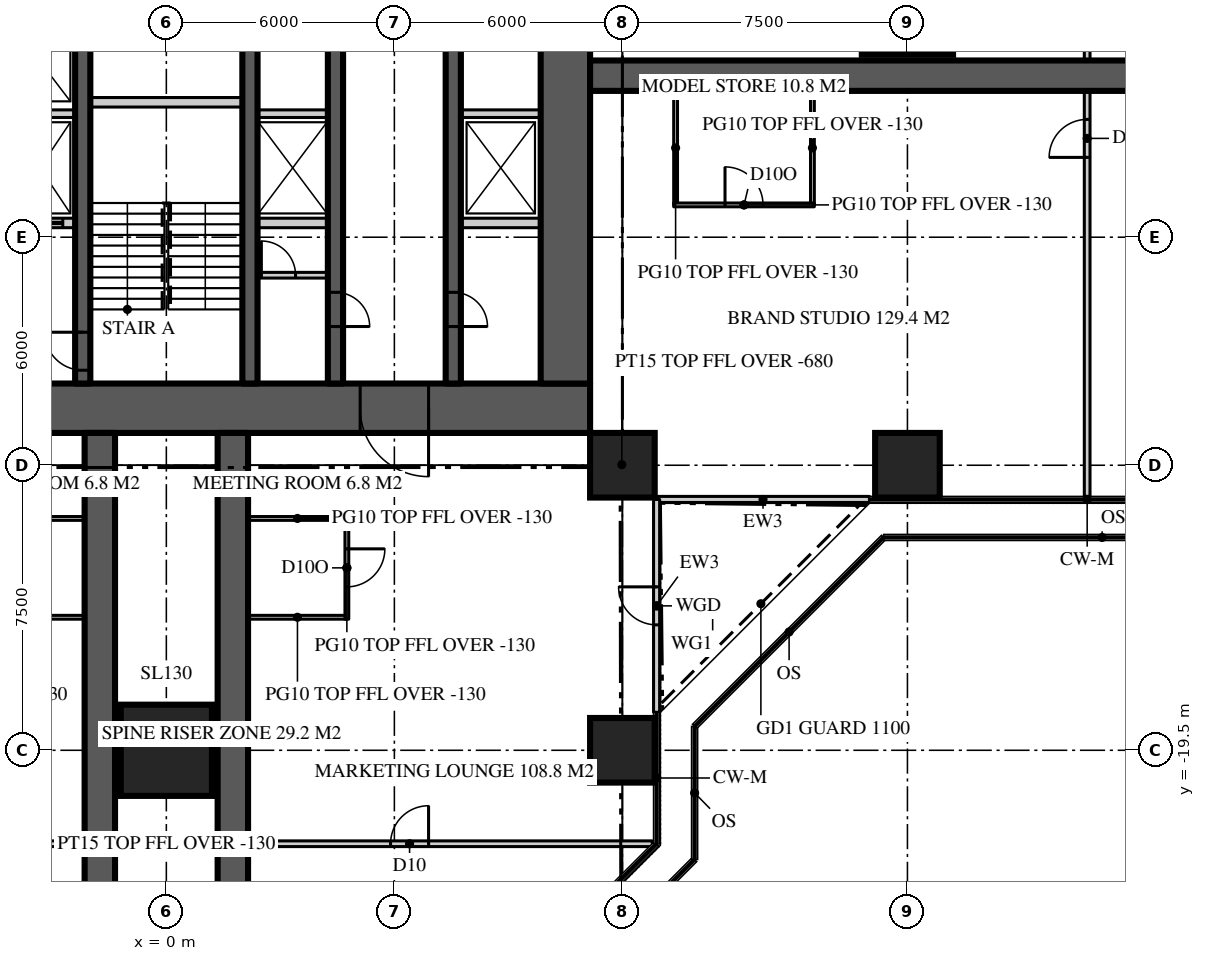
"""IFC4 building model, lengths in metres.
Left out: names, types, materials, properties, quantities, classifications, styles, units other than length and angle.
Written with IfcOpenShell. Run it as: python <this file> out.ifc"""

import sys

from ifc_helpers import new_model, si_unit, direction, frame, frame_2d, origin, origin_2d, place, context, subcontext, project, spatial, rectangle, extrude, element, fill, save


model = new_model("IFC4")
c1 = context("Model", 3, precision=1e-05, world=origin(), true_north=direction((0.0, 1.0)))
c2 = subcontext(c1, "Body", "Model", "MODEL_VIEW")
j1 = project(units=[si_unit("LENGTHUNIT", "METRE"), si_unit("PLANEANGLEUNIT", "RADIAN")], contexts=[c1])
p1 = place(None, origin())
s1 = spatial("IfcSite", under=j1, at=p1, CompositionType="ELEMENT")
p2 = place(p1, origin())
s2 = spatial("IfcBuilding", under=s1, at=p2, CompositionType="ELEMENT")
p3 = place(p2, frame((0.0, 0.0, 182.7)))
s3 = spatial("IfcBuildingStorey", under=s2, at=p3, CompositionType="ELEMENT", Elevation=182.7)
p4 = place(p3, frame((11.15, -10.5, 0.0), z_axis=(0.0, 0.0, 1.0), x_axis=(-1.0, 0.0, 0.0)))
e1 = element("IfcWall", 1, at=p4, inside=s3, PredefinedType="SHEAR", context=c2, shape_type="SweptSolid", body=[
    extrude(rectangle(XDim=22.3, YDim=1.3, at=frame_2d((11.15, 0.0))), origin(), (0.0, 0.0, 1.0), 3.9),
])
p5 = place(p4, frame((16.25, 0.0, 0.0)))
e2 = element("IfcOpeningElement", 2, at=p5, cuts=e1, PredefinedType="OPENING", context=c2, shape_type="SweptSolid", body=[
    extrude(rectangle(XDim=1.8, YDim=2.2, at=frame_2d((0.9, 1.1))), frame((0.0, 0.66, 0.0), z_axis=(0.0, -1.0, 0.0), x_axis=(1.0, 0.0, 0.0)), (0.0, 0.0, 1.0), 1.32),
])
p6 = place(p4, frame((4.25, 0.0, 0.0)))
e3 = element("IfcOpeningElement", 3, at=p6, cuts=e1, PredefinedType="OPENING", context=c2, shape_type="SweptSolid", body=[
    extrude(rectangle(XDim=1.8, YDim=2.2, at=frame_2d((0.9, 1.1))), frame((0.0, 0.66, 0.0), z_axis=(0.0, -1.0, 0.0), x_axis=(1.0, 0.0, 0.0)), (0.0, 0.0, 1.0), 1.32),
])
p7 = place(p3, frame((10.5, -9.85, 0.0), z_axis=(0.0, 0.0, 1.0), x_axis=(0.0, 1.0, 0.0)))
e4 = element("IfcWall", 4, at=p7, inside=s3, PredefinedType="SHEAR", context=c2, shape_type="SweptSolid", body=[
    extrude(rectangle(XDim=19.7, YDim=1.3, at=frame_2d((9.85, 0.0))), origin(), (0.0, 0.0, 1.0), 3.9),
])
p8 = place(p7, frame((17.25, 0.0, 0.0)))
e5 = element("IfcOpeningElement", 5, at=p8, cuts=e4, PredefinedType="OPENING", context=c2, shape_type="SweptSolid", body=[
    extrude(rectangle(XDim=1.0, YDim=2.2, at=frame_2d((0.5, 1.1))), frame((0.0, 0.66, 0.0), z_axis=(0.0, -1.0, 0.0), x_axis=(1.0, 0.0, 0.0)), (0.0, 0.0, 1.0), 1.32),
])
for number, where, z_axis, x_axis in (
    (6, (11.15, -1.75, 0.0), (0.0, 0.0, 1.0), (1.0, 0.0, 0.0)),
    (7, (-1.75, -11.15, 0.0), (0.0, 0.0, 1.0), (0.0, -1.0, 0.0)),
    (8, (1.75, -11.15, 0.0), (0.0, 0.0, 1.0), (0.0, -1.0, 0.0)),
):
    element("IfcWall", number, at=place(p3, frame(where, z_axis=z_axis, x_axis=x_axis)), inside=s3, PredefinedType="SHEAR", context=c2, shape_type="SweptSolid", body=[
        extrude(rectangle(XDim=15.25, YDim=0.8, at=frame_2d((7.625, 0.0))), origin(), (0.0, 0.0, 1.0), 3.9),
    ])
p9 = place(p3, frame((0.0, -19.5, 0.0), z_axis=(0.0, 0.0, 1.0), x_axis=(1.0, 0.0, 0.0)))
e9 = element("IfcColumn", 9, at=p9, inside=s3, PredefinedType="COLUMN", context=c2, shape_type="SweptSolid", body=[
    extrude(rectangle(XDim=2.4, YDim=2.4, at=origin_2d()), origin(), (0.0, 0.0, 1.0), 3.9),
])
for number, where, z_axis, x_axis in (
    (10, (12.0, -19.5, 0.0), (0.0, 0.0, 1.0), (1.0, 0.0, 0.0)),
    (11, (12.0, -12.0, 0.0), (0.0, 0.0, 1.0), (1.0, 0.0, 0.0)),
    (12, (19.5, -12.0, 0.0), (0.0, 0.0, 1.0), (1.0, 0.0, 0.0)),
):
    element("IfcColumn", number, at=place(p3, frame(where, z_axis=z_axis, x_axis=x_axis)), inside=s3, PredefinedType="COLUMN", context=c2, shape_type="SweptSolid", body=[
        extrude(rectangle(XDim=1.7, YDim=1.7, at=origin_2d()), origin(), (0.0, 0.0, 1.0), 3.9),
    ])
p10 = place(p3, frame((19.5, 0.0, 0.0), z_axis=(0.0, 0.0, 1.0), x_axis=(1.0, 0.0, 0.0)))
e13 = element("IfcColumn", 13, at=p10, inside=s3, PredefinedType="COLUMN", context=c2, shape_type="SweptSolid", body=[
    extrude(rectangle(XDim=2.4, YDim=2.4, at=origin_2d()), origin(), (0.0, 0.0, 1.0), 3.9),
])
p11 = place(p3, frame((12.9, -12.9, 0.0), z_axis=(0.0, 0.0, 1.0), x_axis=(1.0, 0.0, 0.0)))
e14 = element("IfcWall", 14, at=p11, inside=s3, PredefinedType="SOLIDWALL", context=c2, shape_type="SweptSolid", body=[
    extrude(rectangle(XDim=5.6, YDim=0.16, at=frame_2d((2.8, 0.0))), origin(), (0.0, 0.0, 1.0), 3.77),
])
p12 = place(p3, frame((12.9, -18.5, 0.0), z_axis=(0.0, 0.0, 1.0), x_axis=(0.0, 1.0, 0.0)))
e15 = element("IfcWall", 15, at=p12, inside=s3, PredefinedType="SOLIDWALL", context=c2, shape_type="SweptSolid", body=[
    extrude(rectangle(XDim=5.6, YDim=0.16, at=frame_2d((2.8, 0.0))), origin(), (0.0, 0.0, 1.0), 3.77),
])
p13 = place(p12, frame((2.3, 0.0, 0.0)))
e16 = element("IfcOpeningElement", 16, at=p13, cuts=e15, PredefinedType="OPENING", context=c2, shape_type="SweptSolid", body=[
    extrude(rectangle(XDim=1.0, YDim=2.2, at=frame_2d((0.5, 1.1))), frame((0.0, 0.09, 0.0), z_axis=(0.0, -1.0, 0.0), x_axis=(1.0, 0.0, 0.0)), (0.0, 0.0, 1.0), 0.18),
])
p14 = place(p3, frame((7.55, 9.85, 0.0), z_axis=(0.0, 0.0, 1.0), x_axis=(0.0, -1.0, 0.0)))
e17 = element("IfcWall", 17, at=p14, inside=s3, PredefinedType="SHEAR", context=c2, shape_type="SweptSolid", body=[
    extrude(rectangle(XDim=19.7, YDim=0.4, at=frame_2d((9.85, 0.0))), origin(), (0.0, 0.0, 1.0), 3.9),
])
p15 = place(p14, frame((1.45, 0.0, 0.0)))
e18 = element("IfcOpeningElement", 18, at=p15, cuts=e17, PredefinedType="OPENING", context=c2, shape_type="SweptSolid", body=[
    extrude(rectangle(XDim=1.0, YDim=2.2, at=frame_2d((0.5, 1.1))), frame((0.0, 0.21, 0.0), z_axis=(0.0, -1.0, 0.0), x_axis=(1.0, 0.0, 0.0)), (0.0, 0.0, 1.0), 0.42),
])
p16 = place(p14, frame((17.3, 0.0, 0.0)))
e19 = element("IfcOpeningElement", 19, at=p16, cuts=e17, PredefinedType="OPENING", context=c2, shape_type="SweptSolid", body=[
    extrude(rectangle(XDim=0.9, YDim=2.1, at=frame_2d((0.45, 1.05))), frame((0.0, 0.21, 0.0), z_axis=(0.0, -1.0, 0.0), x_axis=(1.0, 0.0, 0.0)), (0.0, 0.0, 1.0), 0.42),
])
p17 = place(p3, frame((4.45, 9.85, 0.0), z_axis=(0.0, 0.0, 1.0), x_axis=(0.0, -1.0, 0.0)))
e20 = element("IfcWall", 20, at=p17, inside=s3, PredefinedType="SHEAR", context=c2, shape_type="SweptSolid", body=[
    extrude(rectangle(XDim=19.7, YDim=0.4, at=frame_2d((9.85, 0.0))), origin(), (0.0, 0.0, 1.0), 3.9),
])
p18 = place(p17, frame((1.95, 0.0, 0.0)))
e21 = element("IfcOpeningElement", 21, at=p18, cuts=e20, PredefinedType="OPENING", context=c2, shape_type="SweptSolid", body=[
    extrude(rectangle(XDim=1.0, YDim=2.2, at=frame_2d((0.5, 1.1))), frame((0.0, 0.21, 0.0), z_axis=(0.0, -1.0, 0.0), x_axis=(1.0, 0.0, 0.0)), (0.0, 0.0, 1.0), 0.42),
])
p19 = place(p17, frame((17.3, 0.0, 0.0)))
e22 = element("IfcOpeningElement", 22, at=p19, cuts=e20, PredefinedType="OPENING", context=c2, shape_type="SweptSolid", body=[
    extrude(rectangle(XDim=0.9, YDim=2.1, at=frame_2d((0.45, 1.05))), frame((0.0, 0.21, 0.0), z_axis=(0.0, -1.0, 0.0), x_axis=(1.0, 0.0, 0.0)), (0.0, 0.0, 1.0), 0.42),
])
p20 = place(p3, frame((-2.2, -9.85, 0.0), z_axis=(0.0, 0.0, 1.0), x_axis=(0.0, 1.0, 0.0)))
e23 = element("IfcWall", 23, at=p20, inside=s3, PredefinedType="SHEAR", context=c2, shape_type="SweptSolid", body=[
    extrude(rectangle(XDim=19.7, YDim=0.4, at=frame_2d((9.85, 0.0))), origin(), (0.0, 0.0, 1.0), 3.9),
])
p21 = place(p20, frame((0.35, 0.0, 0.0)))
e24 = element("IfcOpeningElement", 24, at=p21, cuts=e23, PredefinedType="OPENING", context=c2, shape_type="SweptSolid", body=[
    extrude(rectangle(XDim=1.0, YDim=2.2, at=frame_2d((0.5, 1.1))), frame((0.0, 0.21, 0.0), z_axis=(0.0, -1.0, 0.0), x_axis=(1.0, 0.0, 0.0)), (0.0, 0.0, 1.0), 0.42),
])
p22 = place(p3, frame((2.2, 9.85, 0.0), z_axis=(0.0, 0.0, 1.0), x_axis=(0.0, -1.0, 0.0)))
e25 = element("IfcWall", 25, at=p22, inside=s3, PredefinedType="SHEAR", context=c2, shape_type="SweptSolid", body=[
    extrude(rectangle(XDim=19.7, YDim=0.4, at=frame_2d((9.85, 0.0))), origin(), (0.0, 0.0, 1.0), 3.9),
])
p23 = place(p22, frame((0.35, 0.0, 0.0)))
e26 = element("IfcOpeningElement", 26, at=p23, cuts=e25, PredefinedType="OPENING", context=c2, shape_type="SweptSolid", body=[
    extrude(rectangle(XDim=1.0, YDim=2.2, at=frame_2d((0.5, 1.1))), frame((0.0, 0.21, 0.0), z_axis=(0.0, -1.0, 0.0), x_axis=(1.0, 0.0, 0.0)), (0.0, 0.0, 1.0), 0.42),
])
p24 = place(p3, frame((-4.25, -5.625, 0.0), z_axis=(0.0, 0.0, 1.0), x_axis=(1.0, 0.0, 0.0)))
e27 = element("IfcWall", 27, at=p24, inside=s3, PredefinedType="SOLIDWALL", context=c2, shape_type="SweptSolid", body=[
    extrude(rectangle(XDim=1.85, YDim=0.25, at=frame_2d((0.925, 0.0))), origin(), (0.0, 0.0, 1.0), 3.7),
])
p25 = place(p24, frame((0.325, 0.0, 0.0)))
e28 = element("IfcOpeningElement", 28, at=p25, cuts=e27, PredefinedType="OPENING", context=c2, shape_type="SweptSolid", body=[
    extrude(rectangle(XDim=1.2, YDim=2.2, at=frame_2d((0.6, 1.1))), frame((0.0, 0.135, 0.0), z_axis=(0.0, -1.0, 0.0), x_axis=(1.0, 0.0, 0.0)), (0.0, 0.0, 1.0), 0.27),
])
p26 = place(p3, frame((2.4, -5.625, 0.0), z_axis=(0.0, 0.0, 1.0), x_axis=(1.0, 0.0, 0.0)))
e29 = element("IfcWall", 29, at=p26, inside=s3, PredefinedType="SOLIDWALL", context=c2, shape_type="SweptSolid", body=[
    extrude(rectangle(XDim=1.85, YDim=0.25, at=frame_2d((0.925, 0.0))), origin(), (0.0, 0.0, 1.0), 3.7),
])
p27 = place(p3, frame((7.75, -5.625, 0.0), z_axis=(0.0, 0.0, 1.0), x_axis=(1.0, 0.0, 0.0)))
e30 = element("IfcWall", 30, at=p27, inside=s3, PredefinedType="SOLIDWALL", context=c2, shape_type="SweptSolid", body=[
    extrude(rectangle(XDim=2.1, YDim=0.25, at=frame_2d((1.05, 0.0))), origin(), (0.0, 0.0, 1.0), 3.7),
])
p28 = place(p3, frame((-2.0, -2.45, 0.0), z_axis=(0.0, 0.0, 1.0), x_axis=(1.0, 0.0, 0.0)))
e31 = element("IfcWall", 31, at=p28, inside=s3, PredefinedType="SOLIDWALL", context=c2, shape_type="SweptSolid", body=[
    extrude(rectangle(XDim=4.0, YDim=0.25, at=frame_2d((2.0, 0.0))), origin(), (0.0, 0.0, 1.0), 3.7),
])
for number, where, z_axis, x_axis in (
    (32, (-4.25, -2.75, 0.0), (0.0, 0.0, 1.0), (1.0, 0.0, 0.0)),
    (33, (2.4, -2.75, 0.0), (0.0, 0.0, 1.0), (1.0, 0.0, 0.0)),
):
    element("IfcWall", number, at=place(p3, frame(where, z_axis=z_axis, x_axis=x_axis)), inside=s3, PredefinedType="SOLIDWALL", context=c2, shape_type="SweptSolid", body=[
        extrude(rectangle(XDim=1.85, YDim=0.2, at=frame_2d((0.925, 0.0))), origin(), (0.0, 0.0, 1.0), 3.7),
    ])
p29 = place(p3, frame((7.75, -2.75, 0.0), z_axis=(0.0, 0.0, 1.0), x_axis=(1.0, 0.0, 0.0)))
e34 = element("IfcWall", 34, at=p29, inside=s3, PredefinedType="SOLIDWALL", context=c2, shape_type="SweptSolid", body=[
    extrude(rectangle(XDim=2.1, YDim=0.2, at=frame_2d((1.05, 0.0))), origin(), (0.0, 0.0, 1.0), 3.7),
])
p30 = place(p3, frame((24.229, -12.82, 0.0), z_axis=(0.0, 0.0, 1.0), x_axis=(0.0, 1.0, 0.0)))
e35 = element("IfcWall", 35, at=p30, inside=s3, PredefinedType="PARTITIONING", context=c2, shape_type="SweptSolid", body=[
    extrude(rectangle(XDim=25.64, YDim=0.15, at=frame_2d((12.82, 0.0))), origin(), (0.0, 0.0, 1.0), 3.77),
])
p31 = place(p30, frame((15.72, 0.0, 0.0)))
e36 = element("IfcOpeningElement", 36, at=p31, cuts=e35, PredefinedType="OPENING", context=c2, shape_type="SweptSolid", body=[
    extrude(rectangle(XDim=1.0, YDim=2.2, at=frame_2d((0.5, 1.1))), frame((0.0, 0.085, 0.0), z_axis=(0.0, -1.0, 0.0), x_axis=(1.0, 0.0, 0.0)), (0.0, 0.0, 1.0), 0.17),
])
p32 = place(p30, frame((8.92, 0.0, 0.0)))
e37 = element("IfcOpeningElement", 37, at=p32, cuts=e35, PredefinedType="OPENING", context=c2, shape_type="SweptSolid", body=[
    extrude(rectangle(XDim=1.0, YDim=2.2, at=frame_2d((0.5, 1.1))), frame((0.0, 0.085, 0.0), z_axis=(0.0, -1.0, 0.0), x_axis=(1.0, 0.0, 0.0)), (0.0, 0.0, 1.0), 0.17),
])
for number, where, z_axis, x_axis in (
    (38, (13.4, -2.15, 0.0), (0.0, 0.0, 1.0), (0.0, -1.0, 0.0)),
    (39, (17.0, -2.15, 0.0), (0.0, 0.0, 1.0), (0.0, -1.0, 0.0)),
):
    element("IfcWall", number, at=place(p3, frame(where, z_axis=z_axis, x_axis=x_axis)), inside=s3, PredefinedType="PARTITIONING", context=c2, shape_type="SweptSolid", body=[
        extrude(rectangle(XDim=3.0, YDim=0.1, at=frame_2d((1.5, 0.0))), origin(), (0.0, 0.0, 1.0), 3.77),
    ])
p33 = place(p3, frame((13.35, -5.15, 0.0), z_axis=(0.0, 0.0, 1.0), x_axis=(1.0, 0.0, 0.0)))
e40 = element("IfcWall", 40, at=p33, inside=s3, PredefinedType="PARTITIONING", context=c2, shape_type="SweptSolid", body=[
    extrude(rectangle(XDim=3.7, YDim=0.1, at=frame_2d((1.85, 0.0))), origin(), (0.0, 0.0, 1.0), 3.77),
])
p34 = place(p33, frame((1.35, 0.0, 0.0)))
e41 = element("IfcOpeningElement", 41, at=p34, cuts=e40, PredefinedType="OPENING", context=c2, shape_type="SweptSolid", body=[
    extrude(rectangle(XDim=1.0, YDim=2.2, at=frame_2d((0.5, 1.1))), frame((0.0, 0.06, 0.0), z_axis=(0.0, -1.0, 0.0), x_axis=(1.0, 0.0, 0.0)), (0.0, 0.0, 1.0), 0.12),
])
p35 = place(p3, frame((-12.786, -21.959, 0.0), z_axis=(0.0, 0.0, 1.0), x_axis=(1.0, 0.0, 0.0)))
e42 = element("IfcWall", 42, at=p35, inside=s3, PredefinedType="PARTITIONING", context=c2, shape_type="SweptSolid", body=[
    extrude(rectangle(XDim=25.573, YDim=0.15, at=frame_2d((12.786, 0.0))), origin(), (0.0, 0.0, 1.0), 3.77),
])
p36 = place(p35, frame((18.687, 0.0, 0.0)))
e43 = element("IfcOpeningElement", 43, at=p36, cuts=e42, PredefinedType="OPENING", context=c2, shape_type="SweptSolid", body=[
    extrude(rectangle(XDim=1.0, YDim=2.2, at=frame_2d((0.5, 1.1))), frame((0.0, 0.085, 0.0), z_axis=(0.0, -1.0, 0.0), x_axis=(1.0, 0.0, 0.0)), (0.0, 0.0, 1.0), 0.17),
])
p37 = place(p35, frame((5.886, 0.0, 0.0)))
e44 = element("IfcOpeningElement", 44, at=p37, cuts=e42, PredefinedType="OPENING", context=c2, shape_type="SweptSolid", body=[
    extrude(rectangle(XDim=1.0, YDim=2.2, at=frame_2d((0.5, 1.1))), frame((0.0, 0.085, 0.0), z_axis=(0.0, -1.0, 0.0), x_axis=(1.0, 0.0, 0.0)), (0.0, 0.0, 1.0), 0.17),
])
for number, where, z_axis, x_axis in (
    (45, (2.15, -13.4, 0.0), (0.0, 0.0, 1.0), (1.0, 0.0, 0.0)),
    (46, (2.15, -16.0, 0.0), (0.0, 0.0, 1.0), (1.0, 0.0, 0.0)),
):
    element("IfcWall", number, at=place(p3, frame(where, z_axis=z_axis, x_axis=x_axis)), inside=s3, PredefinedType="PARTITIONING", context=c2, shape_type="SweptSolid", body=[
        extrude(rectangle(XDim=2.6, YDim=0.1, at=frame_2d((1.3, 0.0))), origin(), (0.0, 0.0, 1.0), 3.77),
    ])
p38 = place(p3, frame((4.75, -13.35, 0.0), z_axis=(0.0, 0.0, 1.0), x_axis=(0.0, -1.0, 0.0)))
e47 = element("IfcWall", 47, at=p38, inside=s3, PredefinedType="PARTITIONING", context=c2, shape_type="SweptSolid", body=[
    extrude(rectangle(XDim=2.7, YDim=0.1, at=frame_2d((1.35, 0.0))), origin(), (0.0, 0.0, 1.0), 3.77),
])
p39 = place(p38, frame((0.85, 0.0, 0.0)))
e48 = element("IfcOpeningElement", 48, at=p39, cuts=e47, PredefinedType="OPENING", context=c2, shape_type="SweptSolid", body=[
    extrude(rectangle(XDim=1.0, YDim=2.2, at=frame_2d((0.5, 1.1))), frame((0.0, 0.06, 0.0), z_axis=(0.0, -1.0, 0.0), x_axis=(1.0, 0.0, 0.0)), (0.0, 0.0, 1.0), 0.12),
])
for number, where, z_axis, x_axis in (
    (49, (-2.15, -13.4, 0.0), (0.0, 0.0, 1.0), (-1.0, 0.0, 0.0)),
    (50, (-2.15, -16.0, 0.0), (0.0, 0.0, 1.0), (-1.0, 0.0, 0.0)),
):
    element("IfcWall", number, at=place(p3, frame(where, z_axis=z_axis, x_axis=x_axis)), inside=s3, PredefinedType="PARTITIONING", context=c2, shape_type="SweptSolid", body=[
        extrude(rectangle(XDim=2.6, YDim=0.1, at=frame_2d((1.3, 0.0))), origin(), (0.0, 0.0, 1.0), 3.77),
    ])
p40 = place(p3, frame((11.15, -11.15, 0.0), z_axis=(0.0, 0.0, 1.0), x_axis=(0.707106781187, -0.707106781187, 0.0)))
e51 = element("IfcWall", 51, at=p40, inside=s3, PredefinedType="PARTITIONING", context=c2, shape_type="SweptSolid", body=[
    extrude(rectangle(XDim=2.362, YDim=0.15, at=frame_2d((1.181, 0.0))), origin(), (0.0, 0.0, 1.0), 3.22),
])
p41 = place(p3, frame((2.4, -7.0, 0.0), z_axis=(0.0, 0.0, 1.0), x_axis=(1.0, 0.0, 0.0)))
e52 = element("IfcWall", 52, at=p41, inside=s3, PredefinedType="SOLIDWALL", context=c2, shape_type="SweptSolid", body=[
    extrude(rectangle(XDim=1.85, YDim=0.15, at=frame_2d((0.925, 0.0))), origin(), (0.0, 0.0, 1.0), 3.77),
])
p42 = place(p41, frame((0.1, 0.0, 0.0)))
e53 = element("IfcOpeningElement", 53, at=p42, cuts=e52, PredefinedType="OPENING", context=c2, shape_type="SweptSolid", body=[
    extrude(rectangle(XDim=0.9, YDim=2.1, at=frame_2d((0.45, 1.05))), frame((0.0, 0.085, 0.0), z_axis=(0.0, -1.0, 0.0), x_axis=(1.0, 0.0, 0.0)), (0.0, 0.0, 1.0), 0.17),
])
p43 = place(p13, origin())
e54 = element("IfcDoor", 54, at=p43, inside=s3, OperationType="SINGLE_SWING_RIGHT", PredefinedType="DOOR", context=c2, shape_type="SweptSolid", body=[
    extrude(rectangle(XDim=1.0, YDim=2.2, at=frame_2d((0.5, 1.1))), frame((0.0, 0.025, 0.0), z_axis=(0.0, -1.0, 0.0), x_axis=(1.0, 0.0, 0.0)), (0.0, 0.0, 1.0), 0.05),
])
fill(e16, e54)
p44 = place(p6, origin())
e55 = element("IfcDoor", 55, at=p44, inside=s3, OperationType="DOUBLE_DOOR_DOUBLE_SWING", PredefinedType="DOOR", context=c2, shape_type="SweptSolid", body=[
    extrude(rectangle(XDim=1.8, YDim=2.2, at=frame_2d((0.9, 1.1))), frame((0.0, 0.025, 0.0), z_axis=(0.0, -1.0, 0.0), x_axis=(1.0, 0.0, 0.0)), (0.0, 0.0, 1.0), 0.05),
])
fill(e3, e55)
p45 = place(p21, origin())
e56 = element("IfcDoor", 56, at=p45, inside=s3, OperationType="SINGLE_SWING_RIGHT", PredefinedType="DOOR", context=c2, shape_type="SweptSolid", body=[
    extrude(rectangle(XDim=1.0, YDim=2.2, at=frame_2d((0.5, 1.1))), frame((0.0, 0.025, 0.0), z_axis=(0.0, -1.0, 0.0), x_axis=(1.0, 0.0, 0.0)), (0.0, 0.0, 1.0), 0.05),
])
fill(e24, e56)
p46 = place(p16, origin())
e57 = element("IfcDoor", 57, at=p46, inside=s3, OperationType="SINGLE_SWING_RIGHT", PredefinedType="DOOR", context=c2, shape_type="SweptSolid", body=[
    extrude(rectangle(XDim=0.9, YDim=2.1, at=frame_2d((0.45, 1.05))), frame((0.0, 0.025, 0.0), z_axis=(0.0, -1.0, 0.0), x_axis=(1.0, 0.0, 0.0)), (0.0, 0.0, 1.0), 0.05),
])
fill(e19, e57)
p47 = place(p19, origin())
e58 = element("IfcDoor", 58, at=p47, inside=s3, OperationType="SINGLE_SWING_RIGHT", PredefinedType="DOOR", context=c2, shape_type="SweptSolid", body=[
    extrude(rectangle(XDim=0.9, YDim=2.1, at=frame_2d((0.45, 1.05))), frame((0.0, 0.025, 0.0), z_axis=(0.0, -1.0, 0.0), x_axis=(1.0, 0.0, 0.0)), (0.0, 0.0, 1.0), 0.05),
])
fill(e22, e58)
p48 = place(p25, origin())
e59 = element("IfcDoor", 59, at=p48, inside=s3, OperationType="SLIDING_TO_LEFT", PredefinedType="DOOR", context=c2, shape_type="SweptSolid", body=[
    extrude(rectangle(XDim=1.2, YDim=2.2, at=frame_2d((0.6, 1.1))), frame((0.0, 0.025, 0.0), z_axis=(0.0, -1.0, 0.0), x_axis=(1.0, 0.0, 0.0)), (0.0, 0.0, 1.0), 0.05),
])
fill(e28, e59)
p49 = place(p32, origin())
e60 = element("IfcDoor", 60, at=p49, inside=s3, OperationType="SINGLE_SWING_LEFT", PredefinedType="DOOR", context=c2, shape_type="SweptSolid", body=[
    extrude(rectangle(XDim=1.0, YDim=2.2, at=frame_2d((0.5, 1.1))), frame((0.0, 0.025, 0.0), z_axis=(0.0, -1.0, 0.0), x_axis=(1.0, 0.0, 0.0)), (0.0, 0.0, 1.0), 0.05),
])
fill(e37, e60)
p50 = place(p34, origin())
e61 = element("IfcDoor", 61, at=p50, inside=s3, OperationType="SINGLE_SWING_LEFT", PredefinedType="DOOR", context=c2, shape_type="SweptSolid", body=[
    extrude(rectangle(XDim=1.0, YDim=2.2, at=frame_2d((0.5, 1.1))), frame((0.0, 0.025, 0.0), z_axis=(0.0, -1.0, 0.0), x_axis=(1.0, 0.0, 0.0)), (0.0, 0.0, 1.0), 0.05),
])
fill(e41, e61)
p51 = place(p36, origin())
e62 = element("IfcDoor", 62, at=p51, inside=s3, OperationType="SINGLE_SWING_RIGHT", PredefinedType="DOOR", context=c2, shape_type="SweptSolid", body=[
    extrude(rectangle(XDim=1.0, YDim=2.2, at=frame_2d((0.5, 1.1))), frame((0.0, 0.025, 0.0), z_axis=(0.0, -1.0, 0.0), x_axis=(1.0, 0.0, 0.0)), (0.0, 0.0, 1.0), 0.05),
])
fill(e43, e62)
p52 = place(p39, origin())
e63 = element("IfcDoor", 63, at=p52, inside=s3, OperationType="SINGLE_SWING_LEFT", PredefinedType="DOOR", context=c2, shape_type="SweptSolid", body=[
    extrude(rectangle(XDim=1.0, YDim=2.2, at=frame_2d((0.5, 1.1))), frame((0.0, 0.025, 0.0), z_axis=(0.0, -1.0, 0.0), x_axis=(1.0, 0.0, 0.0)), (0.0, 0.0, 1.0), 0.05),
])
fill(e48, e63)
p53 = place(p42, origin())
e64 = element("IfcDoor", 64, at=p53, inside=s3, OperationType="SINGLE_SWING_LEFT", PredefinedType="DOOR", context=c2, shape_type="SweptSolid", body=[
    extrude(rectangle(XDim=0.9, YDim=2.1, at=frame_2d((0.45, 1.05))), frame((0.0, 0.025, 0.0), z_axis=(0.0, -1.0, 0.0), x_axis=(1.0, 0.0, 0.0)), (0.0, 0.0, 1.0), 0.05),
])
fill(e53, e64)
save(model, sys.argv[1])
